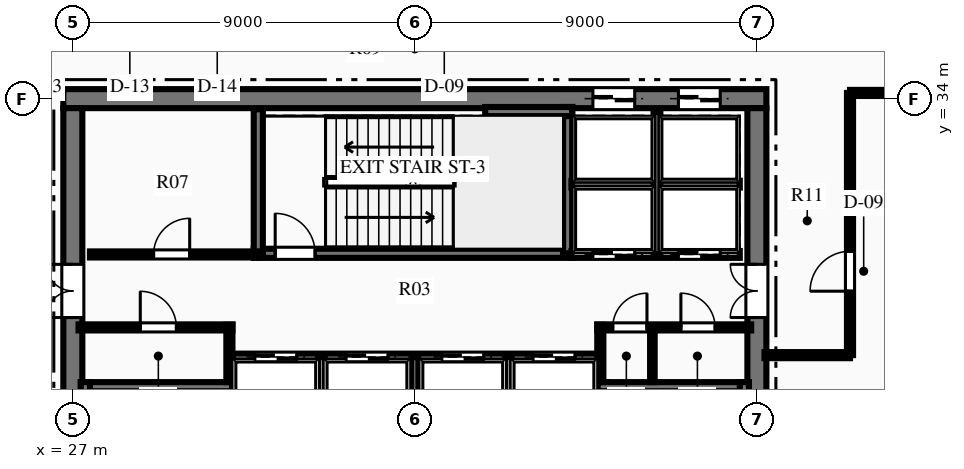
"""IFC4 building model, lengths in metres.
Left out: names, types, materials, properties, quantities, classifications, styles, units other than length and angle.
Written with IfcOpenShell. Run it as: python <this file> out.ifc"""

import sys

from ifc_helpers import new_model, si_unit, direction, frame, frame_2d, origin, place, context, subcontext, project, spatial, rectangle, extrude, element, fill, save


model = new_model("IFC4")
c1 = context("Model", 3, precision=1e-05, world=origin(), true_north=direction((0.0, 1.0)))
c2 = subcontext(c1, "Body", "Model", "MODEL_VIEW")
j1 = project(units=[si_unit("LENGTHUNIT", "METRE"), si_unit("PLANEANGLEUNIT", "RADIAN")], contexts=[c1])
p1 = place(None, origin())
s1 = spatial("IfcSite", under=j1, at=p1, CompositionType="ELEMENT")
p2 = place(p1, origin())
s2 = spatial("IfcBuilding", under=s1, at=p2, CompositionType="ELEMENT")
p3 = place(p2, frame((0.0, 0.0, 193.95)))
s3 = spatial("IfcBuildingStorey", under=s2, at=p3, CompositionType="ELEMENT", Elevation=193.95)
p4 = place(p3, frame((26.75, 34.0, 0.0), z_axis=(0.0, 0.0, 1.0), x_axis=(1.0, 0.0, 0.0)))
e1 = element("IfcWall", 1, at=p4, inside=s3, PredefinedType="SHEAR", context=c2, shape_type="SweptSolid", body=[
    extrude(rectangle(XDim=18.5, YDim=0.5, at=frame_2d((9.25, 0.0))), origin(), (0.0, 0.0, 1.0), 4.5),
])
p5 = place(p4, frame((13.935, 0.0, 0.0)))
e2 = element("IfcOpeningElement", 2, at=p5, cuts=e1, PredefinedType="OPENING", context=c2, shape_type="SweptSolid", body=[
    extrude(rectangle(XDim=1.1, YDim=2.15, at=frame_2d((0.55, 1.075))), frame((0.0, 0.26, 0.0), z_axis=(0.0, -1.0, 0.0), x_axis=(1.0, 0.0, 0.0)), (0.0, 0.0, 1.0), 0.52),
])
p6 = place(p4, frame((16.185, 0.0, 0.0)))
e3 = element("IfcOpeningElement", 3, at=p6, cuts=e1, PredefinedType="OPENING", context=c2, shape_type="SweptSolid", body=[
    extrude(rectangle(XDim=1.1, YDim=2.15, at=frame_2d((0.55, 1.075))), frame((0.0, 0.26, 0.0), z_axis=(0.0, -1.0, 0.0), x_axis=(1.0, 0.0, 0.0)), (0.0, 0.0, 1.0), 0.52),
])
p7 = place(p3, frame((27.0, 18.25, 0.0), z_axis=(0.0, 0.0, 1.0), x_axis=(0.0, 1.0, 0.0)))
e4 = element("IfcWall", 4, at=p7, inside=s3, PredefinedType="SHEAR", context=c2, shape_type="SweptSolid", body=[
    extrude(rectangle(XDim=15.5, YDim=0.5, at=frame_2d((7.75, 0.0))), origin(), (0.0, 0.0, 1.0), 4.5),
])
p8 = place(p7, frame((9.99, 0.0, 0.0)))
e5 = element("IfcOpeningElement", 5, at=p8, cuts=e4, PredefinedType="OPENING", context=c2, shape_type="SweptSolid", body=[
    extrude(rectangle(XDim=1.4, YDim=2.2, at=frame_2d((0.7, 1.1))), frame((0.0, 0.26, 0.0), z_axis=(0.0, -1.0, 0.0), x_axis=(1.0, 0.0, 0.0)), (0.0, 0.0, 1.0), 0.52),
])
p9 = place(p3, frame((45.0, 18.25, 0.0), z_axis=(0.0, 0.0, 1.0), x_axis=(0.0, 1.0, 0.0)))
e6 = element("IfcWall", 6, at=p9, inside=s3, PredefinedType="SHEAR", context=c2, shape_type="SweptSolid", body=[
    extrude(rectangle(XDim=15.5, YDim=0.5, at=frame_2d((7.75, 0.0))), origin(), (0.0, 0.0, 1.0), 4.5),
])
p10 = place(p9, frame((9.99, 0.0, 0.0)))
e7 = element("IfcOpeningElement", 7, at=p10, cuts=e6, PredefinedType="OPENING", context=c2, shape_type="SweptSolid", body=[
    extrude(rectangle(XDim=1.4, YDim=2.2, at=frame_2d((0.7, 1.1))), frame((0.0, 0.26, 0.0), z_axis=(0.0, -1.0, 0.0), x_axis=(1.0, 0.0, 0.0)), (0.0, 0.0, 1.0), 0.52),
])
p11 = place(p3, frame((31.07, 18.28, 0.0), z_axis=(0.0, 0.0, 1.0), x_axis=(0.0, 1.0, 0.0)))
e8 = element("IfcWall", 8, at=p11, inside=s3, PredefinedType="SHEAR", context=c2, shape_type="SweptSolid", body=[
    extrude(rectangle(XDim=8.26, YDim=0.24, at=frame_2d((4.13, 0.0))), origin(), (0.0, 0.0, 1.0), 4.5),
])
p12 = place(p11, frame((0.365, 0.0, 0.0)))
e9 = element("IfcOpeningElement", 9, at=p12, cuts=e8, PredefinedType="OPENING", context=c2, shape_type="SweptSolid", body=[
    extrude(rectangle(XDim=1.05, YDim=2.15, at=frame_2d((0.525, 1.075))), frame((0.0, 0.13, 0.0), z_axis=(0.0, -1.0, 0.0), x_axis=(1.0, 0.0, 0.0)), (0.0, 0.0, 1.0), 0.26),
])
p13 = place(p3, frame((27.21, 26.42, 0.0), z_axis=(0.0, 0.0, 1.0), x_axis=(1.0, 0.0, 0.0)))
e10 = element("IfcWall", 10, at=p13, inside=s3, PredefinedType="SHEAR", context=c2, shape_type="SweptSolid", body=[
    extrude(rectangle(XDim=3.98, YDim=0.24, at=frame_2d((1.99, 0.0))), origin(), (0.0, 0.0, 1.0), 4.5),
])
p14 = place(p3, frame((27.33, 18.28, 0.0), z_axis=(0.0, 0.0, 1.0), x_axis=(0.0, 1.0, 0.0)))
e11 = element("IfcWall", 11, at=p14, inside=s3, PredefinedType="SHEAR", context=c2, shape_type="SweptSolid", body=[
    extrude(rectangle(XDim=8.26, YDim=0.24, at=frame_2d((4.13, 0.0))), origin(), (0.0, 0.0, 1.0), 4.5),
])
p15 = place(p3, frame((40.93, 18.28, 0.0), z_axis=(0.0, 0.0, 1.0), x_axis=(0.0, 1.0, 0.0)))
e12 = element("IfcWall", 12, at=p15, inside=s3, PredefinedType="SHEAR", context=c2, shape_type="SweptSolid", body=[
    extrude(rectangle(XDim=8.26, YDim=0.24, at=frame_2d((4.13, 0.0))), origin(), (0.0, 0.0, 1.0), 4.5),
])
p16 = place(p15, frame((0.365, 0.0, 0.0)))
e13 = element("IfcOpeningElement", 13, at=p16, cuts=e12, PredefinedType="OPENING", context=c2, shape_type="SweptSolid", body=[
    extrude(rectangle(XDim=1.05, YDim=2.15, at=frame_2d((0.525, 1.075))), frame((0.0, 0.13, 0.0), z_axis=(0.0, -1.0, 0.0), x_axis=(1.0, 0.0, 0.0)), (0.0, 0.0, 1.0), 0.26),
])
p17 = place(p3, frame((40.81, 26.42, 0.0), z_axis=(0.0, 0.0, 1.0), x_axis=(1.0, 0.0, 0.0)))
e14 = element("IfcWall", 14, at=p17, inside=s3, PredefinedType="SHEAR", context=c2, shape_type="SweptSolid", body=[
    extrude(rectangle(XDim=3.98, YDim=0.24, at=frame_2d((1.99, 0.0))), origin(), (0.0, 0.0, 1.0), 4.5),
])
p18 = place(p3, frame((44.67, 18.28, 0.0), z_axis=(0.0, 0.0, 1.0), x_axis=(0.0, 1.0, 0.0)))
e15 = element("IfcWall", 15, at=p18, inside=s3, PredefinedType="SHEAR", context=c2, shape_type="SweptSolid", body=[
    extrude(rectangle(XDim=8.26, YDim=0.24, at=frame_2d((4.13, 0.0))), origin(), (0.0, 0.0, 1.0), 4.5),
])
p19 = place(p3, frame((31.76, 29.93, 0.0), z_axis=(0.0, 0.0, 1.0), x_axis=(1.0, 0.0, 0.0)))
e16 = element("IfcWall", 16, at=p19, inside=s3, PredefinedType="SHEAR", context=c2, shape_type="SweptSolid", body=[
    extrude(rectangle(XDim=8.38, YDim=0.24, at=frame_2d((4.19, 0.0))), origin(), (0.0, 0.0, 1.0), 4.5),
])
p20 = place(p19, frame((0.565, 0.0, 0.0)))
e17 = element("IfcOpeningElement", 17, at=p20, cuts=e16, PredefinedType="OPENING", context=c2, shape_type="SweptSolid", body=[
    extrude(rectangle(XDim=1.05, YDim=2.15, at=frame_2d((0.525, 1.075))), frame((0.0, 0.13, 0.0), z_axis=(0.0, -1.0, 0.0), x_axis=(1.0, 0.0, 0.0)), (0.0, 0.0, 1.0), 0.26),
])
p21 = place(p3, frame((31.88, 29.93, 0.0), z_axis=(0.0, 0.0, 1.0), x_axis=(0.0, 1.0, 0.0)))
e18 = element("IfcWall", 18, at=p21, inside=s3, PredefinedType="SHEAR", context=c2, shape_type="SweptSolid", body=[
    extrude(rectangle(XDim=3.79, YDim=0.24, at=frame_2d((1.895, 0.0))), origin(), (0.0, 0.0, 1.0), 4.5),
])
p22 = place(p3, frame((40.02, 29.93, 0.0), z_axis=(0.0, 0.0, 1.0), x_axis=(0.0, 1.0, 0.0)))
e19 = element("IfcWall", 19, at=p22, inside=s3, PredefinedType="SHEAR", context=c2, shape_type="SweptSolid", body=[
    extrude(rectangle(XDim=3.85, YDim=0.24, at=frame_2d((1.925, 0.0))), origin(), (0.0, 0.0, 1.0), 4.5),
])
p23 = place(p3, frame((37.85, 33.66, 0.0), z_axis=(0.0, 0.0, 1.0), x_axis=(1.0, 0.0, 0.0)))
e20 = element("IfcWall", 20, at=p23, inside=s3, PredefinedType="SHEAR", context=c2, shape_type="SweptSolid", body=[
    extrude(rectangle(XDim=2.29, YDim=0.24, at=frame_2d((1.145, 0.0))), origin(), (0.0, 0.0, 1.0), 4.5),
])
p24 = place(p3, frame((27.15, 27.98, 0.0), z_axis=(0.0, 0.0, 1.0), x_axis=(1.0, 0.0, 0.0)))
e21 = element("IfcWall", 21, at=p24, inside=s3, PredefinedType="PARTITIONING", context=c2, shape_type="SweptSolid", body=[
    extrude(rectangle(XDim=4.05, YDim=0.16, at=frame_2d((2.025, 0.0))), origin(), (0.0, 0.0, 1.0), 4.22),
])
p25 = place(p24, frame((1.625, 0.0, 0.0)))
e22 = element("IfcOpeningElement", 22, at=p25, cuts=e21, PredefinedType="OPENING", context=c2, shape_type="SweptSolid", body=[
    extrude(rectangle(XDim=0.95, YDim=2.15, at=frame_2d((0.475, 1.075))), frame((0.0, 0.09, 0.0), z_axis=(0.0, -1.0, 0.0), x_axis=(1.0, 0.0, 0.0)), (0.0, 0.0, 1.0), 0.18),
])
p26 = place(p3, frame((31.12, 26.54, 0.0), z_axis=(0.0, 0.0, 1.0), x_axis=(0.0, 1.0, 0.0)))
e23 = element("IfcWall", 23, at=p26, inside=s3, PredefinedType="PARTITIONING", context=c2, shape_type="SweptSolid", body=[
    extrude(rectangle(XDim=1.51, YDim=0.16, at=frame_2d((0.755, 0.0))), origin(), (0.0, 0.0, 1.0), 4.22),
])
p27 = place(p3, frame((40.8, 27.98, 0.0), z_axis=(0.0, 0.0, 1.0), x_axis=(1.0, 0.0, 0.0)))
e24 = element("IfcWall", 24, at=p27, inside=s3, PredefinedType="PARTITIONING", context=c2, shape_type="SweptSolid", body=[
    extrude(rectangle(XDim=4.05, YDim=0.16, at=frame_2d((2.025, 0.0))), origin(), (0.0, 0.0, 1.0), 4.22),
])
p28 = place(p27, frame((0.407, 0.0, 0.0)))
e25 = element("IfcOpeningElement", 25, at=p28, cuts=e24, PredefinedType="OPENING", context=c2, shape_type="SweptSolid", body=[
    extrude(rectangle(XDim=0.9, YDim=2.15, at=frame_2d((0.45, 1.075))), frame((0.0, 0.09, 0.0), z_axis=(0.0, -1.0, 0.0), x_axis=(1.0, 0.0, 0.0)), (0.0, 0.0, 1.0), 0.18),
])
p29 = place(p27, frame((2.2, 0.0, 0.0)))
e26 = element("IfcOpeningElement", 26, at=p29, cuts=e24, PredefinedType="OPENING", context=c2, shape_type="SweptSolid", body=[
    extrude(rectangle(XDim=0.9, YDim=2.15, at=frame_2d((0.45, 1.075))), frame((0.0, 0.09, 0.0), z_axis=(0.0, -1.0, 0.0), x_axis=(1.0, 0.0, 0.0)), (0.0, 0.0, 1.0), 0.18),
])
p30 = place(p3, frame((40.88, 26.54, 0.0), z_axis=(0.0, 0.0, 1.0), x_axis=(0.0, 1.0, 0.0)))
e27 = element("IfcWall", 27, at=p30, inside=s3, PredefinedType="PARTITIONING", context=c2, shape_type="SweptSolid", body=[
    extrude(rectangle(XDim=1.51, YDim=0.16, at=frame_2d((0.755, 0.0))), origin(), (0.0, 0.0, 1.0), 4.22),
])
p31 = place(p3, frame((42.25, 26.54, 0.0), z_axis=(0.0, 0.0, 1.0), x_axis=(0.0, 1.0, 0.0)))
e28 = element("IfcWall", 28, at=p31, inside=s3, PredefinedType="PARTITIONING", context=c2, shape_type="SweptSolid", body=[
    extrude(rectangle(XDim=1.44, YDim=0.12, at=frame_2d((0.72, 0.0))), origin(), (0.0, 0.0, 1.0), 4.22),
])
p32 = place(p3, frame((27.45, 29.9, 0.0), z_axis=(0.0, 0.0, 1.0), x_axis=(1.0, 0.0, 0.0)))
e29 = element("IfcWall", 29, at=p32, inside=s3, PredefinedType="PARTITIONING", context=c2, shape_type="SweptSolid", body=[
    extrude(rectangle(XDim=4.43, YDim=0.16, at=frame_2d((2.215, 0.0))), origin(), (0.0, 0.0, 1.0), 4.22),
])
p33 = place(p32, frame((1.675, 0.0, 0.0)))
e30 = element("IfcOpeningElement", 30, at=p33, cuts=e29, PredefinedType="OPENING", context=c2, shape_type="SweptSolid", body=[
    extrude(rectangle(XDim=0.95, YDim=2.15, at=frame_2d((0.475, 1.075))), frame((0.0, 0.09, 0.0), z_axis=(0.0, -1.0, 0.0), x_axis=(1.0, 0.0, 0.0)), (0.0, 0.0, 1.0), 0.18),
])
p34 = place(p3, frame((40.12, 29.9, 0.0), z_axis=(0.0, 0.0, 1.0), x_axis=(1.0, 0.0, 0.0)))
e31 = element("IfcWall", 31, at=p34, inside=s3, PredefinedType="PARTITIONING", context=c2, shape_type="SweptSolid", body=[
    extrude(rectangle(XDim=4.43, YDim=0.18, at=frame_2d((2.215, 0.0))), origin(), (0.0, 0.0, 1.0), 4.22),
])
p35 = place(p34, frame((0.565, 0.0, 0.0)))
e32 = element("IfcOpeningElement", 32, at=p35, cuts=e31, PredefinedType="OPENING", context=c2, shape_type="SweptSolid", body=[
    extrude(rectangle(XDim=1.1, YDim=2.15, at=frame_2d((0.55, 1.075))), frame((0.0, 0.1, 0.0), z_axis=(0.0, -1.0, 0.0), x_axis=(1.0, 0.0, 0.0)), (0.0, 0.0, 1.0), 0.2),
])
p36 = place(p34, frame((2.815, 0.0, 0.0)))
e33 = element("IfcOpeningElement", 33, at=p36, cuts=e31, PredefinedType="OPENING", context=c2, shape_type="SweptSolid", body=[
    extrude(rectangle(XDim=1.1, YDim=2.15, at=frame_2d((0.55, 1.075))), frame((0.0, 0.1, 0.0), z_axis=(0.0, -1.0, 0.0), x_axis=(1.0, 0.0, 0.0)), (0.0, 0.0, 1.0), 0.2),
])
p37 = place(p3, frame((40.12, 31.75, 0.0), z_axis=(0.0, 0.0, 1.0), x_axis=(1.0, 0.0, 0.0)))
e34 = element("IfcWall", 34, at=p37, inside=s3, PredefinedType="PARTITIONING", context=c2, shape_type="SweptSolid", body=[
    extrude(rectangle(XDim=4.43, YDim=0.18, at=frame_2d((2.215, 0.0))), origin(), (0.0, 0.0, 1.0), 4.22),
])
p38 = place(p3, frame((42.37, 29.9, 0.0), z_axis=(0.0, 0.0, 1.0), x_axis=(0.0, 1.0, 0.0)))
e35 = element("IfcWall", 35, at=p38, inside=s3, PredefinedType="PARTITIONING", context=c2, shape_type="SweptSolid", body=[
    extrude(rectangle(XDim=3.75, YDim=0.18, at=frame_2d((1.875, 0.0))), origin(), (0.0, 0.0, 1.0), 4.22),
])
p39 = place(p3, frame((31.2, 27.2, 0.0), z_axis=(0.0, 0.0, 1.0), x_axis=(1.0, 0.0, 0.0)))
e36 = element("IfcWall", 36, at=p39, inside=s3, PredefinedType="PARTITIONING", context=c2, shape_type="SweptSolid", body=[
    extrude(rectangle(XDim=9.6, YDim=0.18, at=frame_2d((4.8, 0.0))), origin(), (0.0, 0.0, 1.0), 4.22),
])
p40 = place(p39, frame((0.59, 0.0, 0.0)))
e37 = element("IfcOpeningElement", 37, at=p40, cuts=e36, PredefinedType="OPENING", context=c2, shape_type="SweptSolid", body=[
    extrude(rectangle(XDim=1.1, YDim=2.15, at=frame_2d((0.55, 1.075))), frame((0.0, 0.1, 0.0), z_axis=(0.0, -1.0, 0.0), x_axis=(1.0, 0.0, 0.0)), (0.0, 0.0, 1.0), 0.2),
])
p41 = place(p39, frame((2.99, 0.0, 0.0)))
e38 = element("IfcOpeningElement", 38, at=p41, cuts=e36, PredefinedType="OPENING", context=c2, shape_type="SweptSolid", body=[
    extrude(rectangle(XDim=1.1, YDim=2.15, at=frame_2d((0.55, 1.075))), frame((0.0, 0.1, 0.0), z_axis=(0.0, -1.0, 0.0), x_axis=(1.0, 0.0, 0.0)), (0.0, 0.0, 1.0), 0.2),
])
p42 = place(p39, frame((5.51, 0.0, 0.0)))
e39 = element("IfcOpeningElement", 39, at=p42, cuts=e36, PredefinedType="OPENING", context=c2, shape_type="SweptSolid", body=[
    extrude(rectangle(XDim=1.1, YDim=2.15, at=frame_2d((0.55, 1.075))), frame((0.0, 0.1, 0.0), z_axis=(0.0, -1.0, 0.0), x_axis=(1.0, 0.0, 0.0)), (0.0, 0.0, 1.0), 0.2),
])
p43 = place(p39, frame((7.91, 0.0, 0.0)))
e40 = element("IfcOpeningElement", 40, at=p43, cuts=e36, PredefinedType="OPENING", context=c2, shape_type="SweptSolid", body=[
    extrude(rectangle(XDim=1.1, YDim=2.15, at=frame_2d((0.55, 1.075))), frame((0.0, 0.1, 0.0), z_axis=(0.0, -1.0, 0.0), x_axis=(1.0, 0.0, 0.0)), (0.0, 0.0, 1.0), 0.2),
])
for number, where, z_axis, x_axis in (
    (41, (33.54, 25.3, 0.0), (0.0, 0.0, 1.0), (0.0, 1.0, 0.0)),
    (42, (36.0, 25.3, 0.0), (0.0, 0.0, 1.0), (0.0, 1.0, 0.0)),
    (43, (38.46, 25.3, 0.0), (0.0, 0.0, 1.0), (0.0, 1.0, 0.0)),
):
    element("IfcWall", number, at=place(p3, frame(where, z_axis=z_axis, x_axis=x_axis)), inside=s3, PredefinedType="PARTITIONING", context=c2, shape_type="SweptSolid", body=[
        extrude(rectangle(XDim=1.9, YDim=0.18, at=frame_2d((0.95, 0.0))), origin(), (0.0, 0.0, 1.0), 4.22),
    ])
p44 = place(p3, frame((47.45, 34.15, 0.0), z_axis=(0.0, 0.0, 1.0), x_axis=(1.0, 0.0, 0.0)))
e44 = element("IfcWall", 44, at=p44, inside=s3, PredefinedType="PARTITIONING", context=c2, shape_type="SweptSolid", body=[
    extrude(rectangle(XDim=6.35, YDim=0.16, at=frame_2d((3.175, 0.0))), origin(), (0.0, 0.0, 1.0), 4.22),
])
p45 = place(p3, frame((47.45, 27.25, 0.0), z_axis=(0.0, 0.0, 1.0), x_axis=(0.0, 1.0, 0.0)))
e45 = element("IfcWall", 45, at=p45, inside=s3, PredefinedType="PARTITIONING", context=c2, shape_type="SweptSolid", body=[
    extrude(rectangle(XDim=6.9, YDim=0.16, at=frame_2d((3.45, 0.0))), origin(), (0.0, 0.0, 1.0), 4.22),
])
p46 = place(p45, frame((1.683, 0.0, 0.0)))
e46 = element("IfcOpeningElement", 46, at=p46, cuts=e45, PredefinedType="OPENING", context=c2, shape_type="SweptSolid", body=[
    extrude(rectangle(XDim=1.05, YDim=2.15, at=frame_2d((0.525, 1.075))), frame((0.0, 0.09, 0.0), z_axis=(0.0, -1.0, 0.0), x_axis=(1.0, 0.0, 0.0)), (0.0, 0.0, 1.0), 0.18),
])
p47 = place(p3, frame((45.2, 27.25, 0.0), z_axis=(0.0, 0.0, 1.0), x_axis=(1.0, 0.0, 0.0)))
e47 = element("IfcWall", 47, at=p47, inside=s3, PredefinedType="PARTITIONING", context=c2, shape_type="SweptSolid", body=[
    extrude(rectangle(XDim=2.25, YDim=0.16, at=frame_2d((1.125, 0.0))), origin(), (0.0, 0.0, 1.0), 4.22),
])
p48 = place(p25, origin())
e48 = element("IfcDoor", 48, at=p48, inside=s3, OperationType="SINGLE_SWING_LEFT", PredefinedType="DOOR", context=c2, shape_type="SweptSolid", body=[
    extrude(rectangle(XDim=0.95, YDim=2.15, at=frame_2d((0.475, 1.075))), frame((0.0, 0.025, 0.0), z_axis=(0.0, -1.0, 0.0), x_axis=(1.0, 0.0, 0.0)), (0.0, 0.0, 1.0), 0.05),
])
fill(e22, e48)
p49 = place(p28, origin())
e49 = element("IfcDoor", 49, at=p49, inside=s3, OperationType="SINGLE_SWING_RIGHT", PredefinedType="DOOR", context=c2, shape_type="SweptSolid", body=[
    extrude(rectangle(XDim=0.9, YDim=2.15, at=frame_2d((0.45, 1.075))), frame((0.0, 0.025, 0.0), z_axis=(0.0, -1.0, 0.0), x_axis=(1.0, 0.0, 0.0)), (0.0, 0.0, 1.0), 0.05),
])
fill(e25, e49)
p50 = place(p29, origin())
e50 = element("IfcDoor", 50, at=p50, inside=s3, OperationType="SINGLE_SWING_LEFT", PredefinedType="DOOR", context=c2, shape_type="SweptSolid", body=[
    extrude(rectangle(XDim=0.9, YDim=2.15, at=frame_2d((0.45, 1.075))), frame((0.0, 0.025, 0.0), z_axis=(0.0, -1.0, 0.0), x_axis=(1.0, 0.0, 0.0)), (0.0, 0.0, 1.0), 0.05),
])
fill(e26, e50)
p51 = place(p33, origin())
e51 = element("IfcDoor", 51, at=p51, inside=s3, OperationType="SINGLE_SWING_RIGHT", PredefinedType="DOOR", context=c2, shape_type="SweptSolid", body=[
    extrude(rectangle(XDim=0.95, YDim=2.15, at=frame_2d((0.475, 1.075))), frame((0.0, 0.025, 0.0), z_axis=(0.0, -1.0, 0.0), x_axis=(1.0, 0.0, 0.0)), (0.0, 0.0, 1.0), 0.05),
])
fill(e30, e51)
p52 = place(p20, origin())
e52 = element("IfcDoor", 52, at=p52, inside=s3, OperationType="SINGLE_SWING_LEFT", PredefinedType="DOOR", context=c2, shape_type="SweptSolid", body=[
    extrude(rectangle(XDim=1.05, YDim=2.15, at=frame_2d((0.525, 1.075))), frame((0.0, 0.025, 0.0), z_axis=(0.0, -1.0, 0.0), x_axis=(1.0, 0.0, 0.0)), (0.0, 0.0, 1.0), 0.05),
])
fill(e17, e52)
p53 = place(p8, origin())
e53 = element("IfcDoor", 53, at=p53, inside=s3, OperationType="DOUBLE_DOOR_SINGLE_SWING", PredefinedType="DOOR", context=c2, shape_type="SweptSolid", body=[
    extrude(rectangle(XDim=1.4, YDim=2.2, at=frame_2d((0.7, 1.1))), frame((0.0, 0.025, 0.0), z_axis=(0.0, -1.0, 0.0), x_axis=(1.0, 0.0, 0.0)), (0.0, 0.0, 1.0), 0.05),
])
fill(e5, e53)
p54 = place(p10, origin())
e54 = element("IfcDoor", 54, at=p54, inside=s3, OperationType="DOUBLE_DOOR_SINGLE_SWING", PredefinedType="DOOR", context=c2, shape_type="SweptSolid", body=[
    extrude(rectangle(XDim=1.4, YDim=2.2, at=frame_2d((0.7, 1.1))), frame((0.0, 0.025, 0.0), z_axis=(0.0, -1.0, 0.0), x_axis=(1.0, 0.0, 0.0)), (0.0, 0.0, 1.0), 0.05),
])
fill(e7, e54)
p55 = place(p46, origin())
e55 = element("IfcDoor", 55, at=p55, inside=s3, OperationType="SINGLE_SWING_LEFT", PredefinedType="DOOR", context=c2, shape_type="SweptSolid", body=[
    extrude(rectangle(XDim=1.05, YDim=2.15, at=frame_2d((0.525, 1.075))), frame((0.0, 0.025, 0.0), z_axis=(0.0, -1.0, 0.0), x_axis=(1.0, 0.0, 0.0)), (0.0, 0.0, 1.0), 0.05),
])
fill(e46, e55)
p56 = place(p35, origin())
e56 = element("IfcDoor", 56, at=p56, inside=s3, OperationType="SLIDING_TO_LEFT", PredefinedType="DOOR", context=c2, shape_type="SweptSolid", body=[
    extrude(rectangle(XDim=1.1, YDim=2.15, at=frame_2d((0.55, 1.075))), frame((0.0, 0.025, 0.0), z_axis=(0.0, -1.0, 0.0), x_axis=(1.0, 0.0, 0.0)), (0.0, 0.0, 1.0), 0.05),
])
fill(e32, e56)
p57 = place(p36, origin())
e57 = element("IfcDoor", 57, at=p57, inside=s3, OperationType="SLIDING_TO_LEFT", PredefinedType="DOOR", context=c2, shape_type="SweptSolid", body=[
    extrude(rectangle(XDim=1.1, YDim=2.15, at=frame_2d((0.55, 1.075))), frame((0.0, 0.025, 0.0), z_axis=(0.0, -1.0, 0.0), x_axis=(1.0, 0.0, 0.0)), (0.0, 0.0, 1.0), 0.05),
])
fill(e33, e57)
p58 = place(p5, origin())
e58 = element("IfcDoor", 58, at=p58, inside=s3, OperationType="SLIDING_TO_LEFT", PredefinedType="DOOR", context=c2, shape_type="SweptSolid", body=[
    extrude(rectangle(XDim=1.1, YDim=2.15, at=frame_2d((0.55, 1.075))), frame((0.0, 0.025, 0.0), z_axis=(0.0, -1.0, 0.0), x_axis=(1.0, 0.0, 0.0)), (0.0, 0.0, 1.0), 0.05),
])
fill(e2, e58)
p59 = place(p6, origin())
e59 = element("IfcDoor", 59, at=p59, inside=s3, OperationType="SLIDING_TO_LEFT", PredefinedType="DOOR", context=c2, shape_type="SweptSolid", body=[
    extrude(rectangle(XDim=1.1, YDim=2.15, at=frame_2d((0.55, 1.075))), frame((0.0, 0.025, 0.0), z_axis=(0.0, -1.0, 0.0), x_axis=(1.0, 0.0, 0.0)), (0.0, 0.0, 1.0), 0.05),
])
fill(e3, e59)
p60 = place(p40, origin())
e60 = element("IfcDoor", 60, at=p60, inside=s3, OperationType="SLIDING_TO_LEFT", PredefinedType="DOOR", context=c2, shape_type="SweptSolid", body=[
    extrude(rectangle(XDim=1.1, YDim=2.15, at=frame_2d((0.55, 1.075))), frame((0.0, 0.025, 0.0), z_axis=(0.0, -1.0, 0.0), x_axis=(1.0, 0.0, 0.0)), (0.0, 0.0, 1.0), 0.05),
])
fill(e37, e60)
p61 = place(p41, origin())
e61 = element("IfcDoor", 61, at=p61, inside=s3, OperationType="SLIDING_TO_LEFT", PredefinedType="DOOR", context=c2, shape_type="SweptSolid", body=[
    extrude(rectangle(XDim=1.1, YDim=2.15, at=frame_2d((0.55, 1.075))), frame((0.0, 0.025, 0.0), z_axis=(0.0, -1.0, 0.0), x_axis=(1.0, 0.0, 0.0)), (0.0, 0.0, 1.0), 0.05),
])
fill(e38, e61)
p62 = place(p42, origin())
e62 = element("IfcDoor", 62, at=p62, inside=s3, OperationType="SLIDING_TO_LEFT", PredefinedType="DOOR", context=c2, shape_type="SweptSolid", body=[
    extrude(rectangle(XDim=1.1, YDim=2.15, at=frame_2d((0.55, 1.075))), frame((0.0, 0.025, 0.0), z_axis=(0.0, -1.0, 0.0), x_axis=(1.0, 0.0, 0.0)), (0.0, 0.0, 1.0), 0.05),
])
fill(e39, e62)
p63 = place(p43, origin())
e63 = element("IfcDoor", 63, at=p63, inside=s3, OperationType="SLIDING_TO_LEFT", PredefinedType="DOOR", context=c2, shape_type="SweptSolid", body=[
    extrude(rectangle(XDim=1.1, YDim=2.15, at=frame_2d((0.55, 1.075))), frame((0.0, 0.025, 0.0), z_axis=(0.0, -1.0, 0.0), x_axis=(1.0, 0.0, 0.0)), (0.0, 0.0, 1.0), 0.05),
])
fill(e40, e63)
save(model, sys.argv[1])
